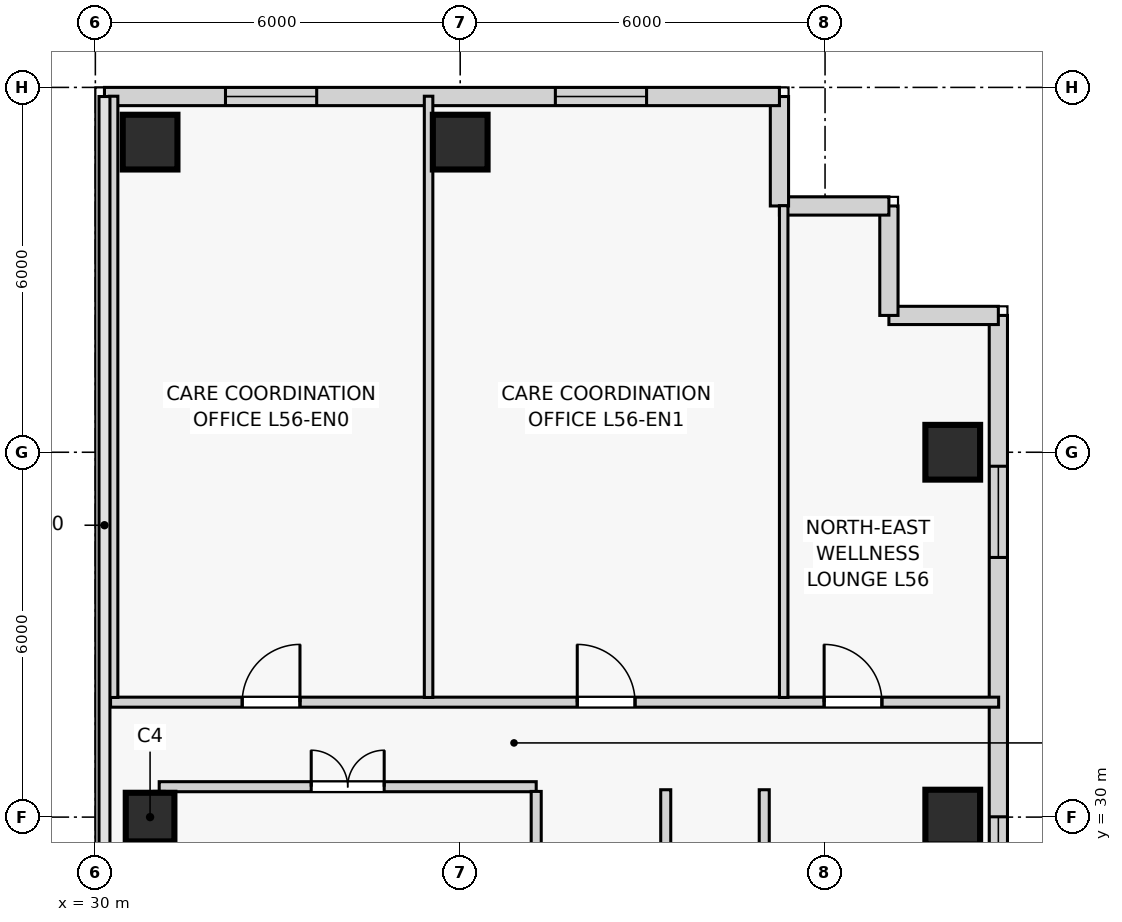
"""IFC4 building model, lengths in metres.
Left out: names, types, materials, properties, quantities, classifications, styles, units other than length and angle.
Written with IfcOpenShell. Run it as: python <this file> out.ifc"""

import sys

from ifc_helpers import new_model, si_unit, direction, frame, frame_2d, origin, origin_2d, place, context, subcontext, project, spatial, rectangle, extrude, source, transform, mapped, element, fill, save


model = new_model("IFC4")
c1 = context("Model", 3, precision=1e-05, world=origin(), true_north=direction((0.0, 1.0)))
c2 = subcontext(c1, "Body", "Model", "MODEL_VIEW")
j1 = project(units=[si_unit("LENGTHUNIT", "METRE"), si_unit("PLANEANGLEUNIT", "RADIAN")], contexts=[c1])
p1 = place(None, origin())
s1 = spatial("IfcSite", under=j1, at=p1, CompositionType="ELEMENT")
p2 = place(p1, origin())
s2 = spatial("IfcBuilding", under=s1, at=p2, CompositionType="ELEMENT")
p3 = place(p2, frame((0.0, 0.0, 213.3)))
s3 = spatial("IfcBuildingStorey", under=s2, at=p3, CompositionType="ELEMENT", Elevation=213.3)
m1 = source(origin(), c2, "Body", "SweptSolid", [
    extrude(rectangle(XDim=0.9, YDim=0.9, at=origin_2d()), origin(), (0.0, 0.0, 1.0), 3.6),
])
for number, where, z_axis, x_axis in (
    (1, (30.9, 41.1, 0.0), (0.0, 0.0, 1.0), (1.0, 0.0, 0.0)),
    (2, (36.0, 41.1, 0.0), (0.0, 0.0, 1.0), (1.0, 0.0, 0.0)),
    (3, (44.1, 30.0, 0.0), (0.0, 0.0, 1.0), (1.0, 0.0, 0.0)),
    (4, (44.1, 36.0, 0.0), (0.0, 0.0, 1.0), (1.0, 0.0, 0.0)),
):
    element("IfcColumn", number, at=place(p3, frame(where, z_axis=z_axis, x_axis=x_axis)), inside=s3, PredefinedType="COLUMN", context=c2, shape_type="MappedRepresentation", body=[
        mapped(m1, transform((0.0, 0.0, 0.0), scale=1.0)),
    ])
m2 = source(origin(), c2, "Body", "SweptSolid", [
    extrude(rectangle(XDim=0.8, YDim=0.8, at=origin_2d()), origin(), (0.0, 0.0, 1.0), 3.6),
])
p4 = place(p3, frame((30.9, 30.0, 0.0), z_axis=(0.0, 0.0, 1.0), x_axis=(1.0, 0.0, 0.0)))
e5 = element("IfcColumn", 5, at=p4, inside=s3, PredefinedType="COLUMN", context=c2, shape_type="MappedRepresentation", body=[
    mapped(m2, transform((0.0, 0.0, 0.0), scale=1.0)),
])
p5 = place(p3, frame((44.85, 26.52, 0.0), z_axis=(0.0, 0.0, 1.0), x_axis=(0.0, 1.0, 0.0)))
e6 = element("IfcWall", 6, at=p5, inside=s3, PredefinedType="SOLIDWALL", context=c2, shape_type="SweptSolid", body=[
    extrude(rectangle(XDim=11.73, YDim=0.3, at=frame_2d((5.865, 0.0))), origin(), (0.0, 0.0, 1.0), 2.95),
])
p6 = place(p5, frame((1.985, 0.0, 0.85)))
e7 = element("IfcOpeningElement", 7, at=p6, cuts=e6, PredefinedType="OPENING", context=c2, shape_type="SweptSolid", body=[
    extrude(rectangle(XDim=1.5, YDim=1.8, at=frame_2d((0.75, 0.9))), frame((0.0, 0.16, 0.0), z_axis=(0.0, -1.0, 0.0), x_axis=(1.0, 0.0, 0.0)), (0.0, 0.0, 1.0), 0.32),
])
p7 = place(p5, frame((7.75, 0.0, 0.85)))
e8 = element("IfcOpeningElement", 8, at=p7, cuts=e6, PredefinedType="OPENING", context=c2, shape_type="SweptSolid", body=[
    extrude(rectangle(XDim=1.5, YDim=1.8, at=frame_2d((0.75, 0.9))), frame((0.0, 0.16, 0.0), z_axis=(0.0, -1.0, 0.0), x_axis=(1.0, 0.0, 0.0)), (0.0, 0.0, 1.0), 0.32),
])
for number, where, z_axis, x_axis in (
    (9, (44.85, 38.25, 0.0), (0.0, 0.0, 1.0), (-1.0, 0.0, 0.0)),
    (10, (43.05, 38.25, 0.0), (0.0, 0.0, 1.0), (0.0, 1.0, 0.0)),
    (11, (43.05, 40.05, 0.0), (0.0, 0.0, 1.0), (-1.0, 0.0, 0.0)),
    (12, (41.25, 40.05, 0.0), (0.0, 0.0, 1.0), (0.0, 1.0, 0.0)),
):
    element("IfcWall", number, at=place(p3, frame(where, z_axis=z_axis, x_axis=x_axis)), inside=s3, PredefinedType="SOLIDWALL", context=c2, shape_type="SweptSolid", body=[
        extrude(rectangle(XDim=1.8, YDim=0.3, at=frame_2d((0.9, 0.0))), origin(), (0.0, 0.0, 1.0), 2.95),
    ])
p8 = place(p3, frame((41.25, 41.85, 0.0), z_axis=(0.0, 0.0, 1.0), x_axis=(-1.0, 0.0, 0.0)))
e13 = element("IfcWall", 13, at=p8, inside=s3, PredefinedType="SOLIDWALL", context=c2, shape_type="SweptSolid", body=[
    extrude(rectangle(XDim=11.1, YDim=0.3, at=frame_2d((5.55, 0.0))), origin(), (0.0, 0.0, 1.0), 2.95),
])
p9 = place(p8, frame((2.185, 0.0, 0.85)))
e14 = element("IfcOpeningElement", 14, at=p9, cuts=e13, PredefinedType="OPENING", context=c2, shape_type="SweptSolid", body=[
    extrude(rectangle(XDim=1.5, YDim=1.8, at=frame_2d((0.75, 0.9))), frame((0.0, 0.16, 0.0), z_axis=(0.0, -1.0, 0.0), x_axis=(1.0, 0.0, 0.0)), (0.0, 0.0, 1.0), 0.32),
])
p10 = place(p8, frame((7.61, 0.0, 0.85)))
e15 = element("IfcOpeningElement", 15, at=p10, cuts=e13, PredefinedType="OPENING", context=c2, shape_type="SweptSolid", body=[
    extrude(rectangle(XDim=1.5, YDim=1.8, at=frame_2d((0.75, 0.9))), frame((0.0, 0.16, 0.0), z_axis=(0.0, -1.0, 0.0), x_axis=(1.0, 0.0, 0.0)), (0.0, 0.0, 1.0), 0.32),
])
p11 = place(p3, frame((31.05, 30.5, 0.0), z_axis=(0.0, 0.0, 1.0), x_axis=(1.0, 0.0, 0.0)))
e16 = element("IfcWall", 16, at=p11, inside=s3, PredefinedType="PARTITIONING", context=c2, shape_type="SweptSolid", body=[
    extrude(rectangle(XDim=6.2, YDim=0.165, at=frame_2d((3.1, 0.0))), origin(), (0.0, 0.0, 1.0), 2.95),
])
p12 = place(p11, frame((2.5, 0.0, 0.0)))
e17 = element("IfcOpeningElement", 17, at=p12, cuts=e16, PredefinedType="OPENING", context=c2, shape_type="SweptSolid", body=[
    extrude(rectangle(XDim=1.2, YDim=2.2, at=frame_2d((0.6, 1.1))), frame((0.0, 0.093, 0.0), z_axis=(0.0, -1.0, 0.0), x_axis=(1.0, 0.0, 0.0)), (0.0, 0.0, 1.0), 0.185),
])
p13 = place(p3, frame((31.05, 27.37, 0.0), z_axis=(0.0, 0.0, 1.0), x_axis=(0.0, 1.0, 0.0)))
e18 = element("IfcWall", 18, at=p13, inside=s3, PredefinedType="PARTITIONING", context=c2, shape_type="SweptSolid", body=[
    extrude(rectangle(XDim=3.052, YDim=0.165, at=frame_2d((1.526, 0.0))), origin(), (0.0, 0.0, 1.0), 2.491),
])
p14 = place(p3, frame((37.25, 27.37, 0.0), z_axis=(0.0, 0.0, 1.0), x_axis=(0.0, 1.0, 0.0)))
e19 = element("IfcWall", 19, at=p14, inside=s3, PredefinedType="PARTITIONING", context=c2, shape_type="SweptSolid", body=[
    extrude(rectangle(XDim=3.052, YDim=0.165, at=frame_2d((1.526, 0.0))), origin(), (0.0, 0.0, 1.0), 2.95),
])
p15 = place(p3, frame((30.25, 31.89, 0.0), z_axis=(0.0, 0.0, 1.0), x_axis=(1.0, 0.0, 0.0)))
e20 = element("IfcWall", 20, at=p15, inside=s3, PredefinedType="PARTITIONING", context=c2, shape_type="SweptSolid", body=[
    extrude(rectangle(XDim=14.605, YDim=0.165, at=frame_2d((7.302, 0.0))), origin(), (0.0, 0.0, 1.0), 2.95),
])
p16 = place(p15, frame((2.165, 0.0, 0.0)))
e21 = element("IfcOpeningElement", 21, at=p16, cuts=e20, PredefinedType="OPENING", context=c2, shape_type="SweptSolid", body=[
    extrude(rectangle(XDim=0.95, YDim=2.1, at=frame_2d((0.475, 1.05))), frame((0.0, 0.093, 0.0), z_axis=(0.0, -1.0, 0.0), x_axis=(1.0, 0.0, 0.0)), (0.0, 0.0, 1.0), 0.185),
])
p17 = place(p15, frame((7.675, 0.0, 0.0)))
e22 = element("IfcOpeningElement", 22, at=p17, cuts=e20, PredefinedType="OPENING", context=c2, shape_type="SweptSolid", body=[
    extrude(rectangle(XDim=0.95, YDim=2.1, at=frame_2d((0.475, 1.05))), frame((0.0, 0.093, 0.0), z_axis=(0.0, -1.0, 0.0), x_axis=(1.0, 0.0, 0.0)), (0.0, 0.0, 1.0), 0.185),
])
p18 = place(p15, frame((11.735, 0.0, 0.0)))
e23 = element("IfcOpeningElement", 23, at=p18, cuts=e20, PredefinedType="OPENING", context=c2, shape_type="SweptSolid", body=[
    extrude(rectangle(XDim=0.95, YDim=2.1, at=frame_2d((0.475, 1.05))), frame((0.0, 0.093, 0.0), z_axis=(0.0, -1.0, 0.0), x_axis=(1.0, 0.0, 0.0)), (0.0, 0.0, 1.0), 0.185),
])
p19 = place(p3, frame((41.0, 11.4, 0.0), z_axis=(0.0, 0.0, 1.0), x_axis=(0.0, 1.0, 0.0)))
e24 = element("IfcWall", 24, at=p19, inside=s3, PredefinedType="PARTITIONING", context=c2, shape_type="SweptSolid", body=[
    extrude(rectangle(XDim=19.05, YDim=0.165, at=frame_2d((9.525, 0.0))), origin(), (0.0, 0.0, 1.0), 2.95),
])
p20 = place(p19, frame((3.475, 0.0, 0.0)))
e25 = element("IfcOpeningElement", 25, at=p20, cuts=e24, PredefinedType="OPENING", context=c2, shape_type="SweptSolid", body=[
    extrude(rectangle(XDim=0.95, YDim=2.1, at=frame_2d((0.475, 1.05))), frame((0.0, 0.093, 0.0), z_axis=(0.0, -1.0, 0.0), x_axis=(1.0, 0.0, 0.0)), (0.0, 0.0, 1.0), 0.185),
])
p21 = place(p19, frame((13.1, 0.0, 0.0)))
e26 = element("IfcOpeningElement", 26, at=p21, cuts=e24, PredefinedType="OPENING", context=c2, shape_type="SweptSolid", body=[
    extrude(rectangle(XDim=0.95, YDim=2.1, at=frame_2d((0.475, 1.05))), frame((0.0, 0.093, 0.0), z_axis=(0.0, -1.0, 0.0), x_axis=(1.0, 0.0, 0.0)), (0.0, 0.0, 1.0), 0.185),
])
p22 = place(p3, frame((39.38, 11.4, 0.0), z_axis=(0.0, 0.0, 1.0), x_axis=(0.0, 1.0, 0.0)))
e27 = element("IfcWall", 27, at=p22, inside=s3, PredefinedType="PARTITIONING", context=c2, shape_type="SweptSolid", body=[
    extrude(rectangle(XDim=19.05, YDim=0.165, at=frame_2d((9.525, 0.0))), origin(), (0.0, 0.0, 1.0), 2.95),
])
p23 = place(p22, frame((8.925, 0.0, 0.0)))
e28 = element("IfcOpeningElement", 28, at=p23, cuts=e27, PredefinedType="OPENING", context=c2, shape_type="SweptSolid", body=[
    extrude(rectangle(XDim=0.95, YDim=2.1, at=frame_2d((0.475, 1.05))), frame((0.0, 0.093, 0.0), z_axis=(0.0, -1.0, 0.0), x_axis=(1.0, 0.0, 0.0)), (0.0, 0.0, 1.0), 0.185),
])
for number, where, z_axis, x_axis in (
    (29, (30.3, 31.968, 0.0), (0.0, 0.0, 1.0), (0.0, 1.0, 0.0)),
    (30, (35.48, 31.968, 0.0), (0.0, 0.0, 1.0), (0.0, 1.0, 0.0)),
):
    element("IfcWall", number, at=place(p3, frame(where, z_axis=z_axis, x_axis=x_axis)), inside=s3, PredefinedType="PARTITIONING", context=c2, shape_type="SweptSolid", body=[
        extrude(rectangle(XDim=9.887, YDim=0.14, at=frame_2d((4.944, 0.0))), origin(), (0.0, 0.0, 1.0), 2.95),
    ])
p24 = place(p3, frame((41.32, 31.968, 0.0), z_axis=(0.0, 0.0, 1.0), x_axis=(0.0, 1.0, 0.0)))
e31 = element("IfcWall", 31, at=p24, inside=s3, PredefinedType="PARTITIONING", context=c2, shape_type="SweptSolid", body=[
    extrude(rectangle(XDim=8.087, YDim=0.14, at=frame_2d((4.044, 0.0))), origin(), (0.0, 0.0, 1.0), 2.95),
])
m3 = source(origin(), c2, "Body", "SweptSolid", [
    extrude(rectangle(XDim=1.5, YDim=1.8, at=frame_2d((0.75, 0.9))), frame((0.0, 0.03, 0.0), z_axis=(0.0, -1.0, 0.0), x_axis=(1.0, 0.0, 0.0)), (0.0, 0.0, 1.0), 0.06),
])
p25 = place(p6, origin())
e32 = element("IfcWindow", 32, at=p25, inside=s3, PartitioningType="SINGLE_PANEL", PredefinedType="WINDOW", context=c2, shape_type="MappedRepresentation", body=[
    mapped(m3, transform((0.0, 0.0, 0.0), scale=1.0)),
])
fill(e7, e32)
p26 = place(p7, origin())
e33 = element("IfcWindow", 33, at=p26, inside=s3, PartitioningType="SINGLE_PANEL", PredefinedType="WINDOW", context=c2, shape_type="MappedRepresentation", body=[
    mapped(m3, transform((0.0, 0.0, 0.0), scale=1.0)),
])
fill(e8, e33)
p27 = place(p9, origin())
e34 = element("IfcWindow", 34, at=p27, inside=s3, PartitioningType="SINGLE_PANEL", PredefinedType="WINDOW", context=c2, shape_type="MappedRepresentation", body=[
    mapped(m3, transform((0.0, 0.0, 0.0), scale=1.0)),
])
fill(e14, e34)
p28 = place(p10, origin())
e35 = element("IfcWindow", 35, at=p28, inside=s3, PartitioningType="SINGLE_PANEL", PredefinedType="WINDOW", context=c2, shape_type="MappedRepresentation", body=[
    mapped(m3, transform((0.0, 0.0, 0.0), scale=1.0)),
])
fill(e15, e35)
m4 = source(origin(), c2, "Body", "SweptSolid", [
    extrude(rectangle(XDim=1.2, YDim=2.2, at=frame_2d((0.6, 1.1))), frame((0.0, 0.025, 0.0), z_axis=(0.0, -1.0, 0.0), x_axis=(1.0, 0.0, 0.0)), (0.0, 0.0, 1.0), 0.05),
])
p29 = place(p12, origin())
e36 = element("IfcDoor", 36, at=p29, inside=s3, OperationType="DOUBLE_DOOR_SINGLE_SWING", PredefinedType="DOOR", context=c2, shape_type="MappedRepresentation", body=[
    mapped(m4, transform((0.0, 0.0, 0.0), scale=1.0)),
])
fill(e17, e36)
m5 = source(origin(), c2, "Body", "SweptSolid", [
    extrude(rectangle(XDim=0.95, YDim=2.1, at=frame_2d((0.475, 1.05))), frame((0.0, 0.025, 0.0), z_axis=(0.0, -1.0, 0.0), x_axis=(1.0, 0.0, 0.0)), (0.0, 0.0, 1.0), 0.05),
])
p30 = place(p16, origin())
e37 = element("IfcDoor", 37, at=p30, inside=s3, OperationType="SINGLE_SWING_RIGHT", PredefinedType="DOOR", context=c2, shape_type="MappedRepresentation", body=[
    mapped(m5, transform((0.0, 0.0, 0.0), scale=1.0)),
])
fill(e21, e37)
p31 = place(p17, origin())
e38 = element("IfcDoor", 38, at=p31, inside=s3, OperationType="SINGLE_SWING_LEFT", PredefinedType="DOOR", context=c2, shape_type="MappedRepresentation", body=[
    mapped(m5, transform((0.0, 0.0, 0.0), scale=1.0)),
])
fill(e22, e38)
p32 = place(p18, origin())
e39 = element("IfcDoor", 39, at=p32, inside=s3, OperationType="SINGLE_SWING_LEFT", PredefinedType="DOOR", context=c2, shape_type="MappedRepresentation", body=[
    mapped(m5, transform((0.0, 0.0, 0.0), scale=1.0)),
])
fill(e23, e39)
save(model, sys.argv[1])
